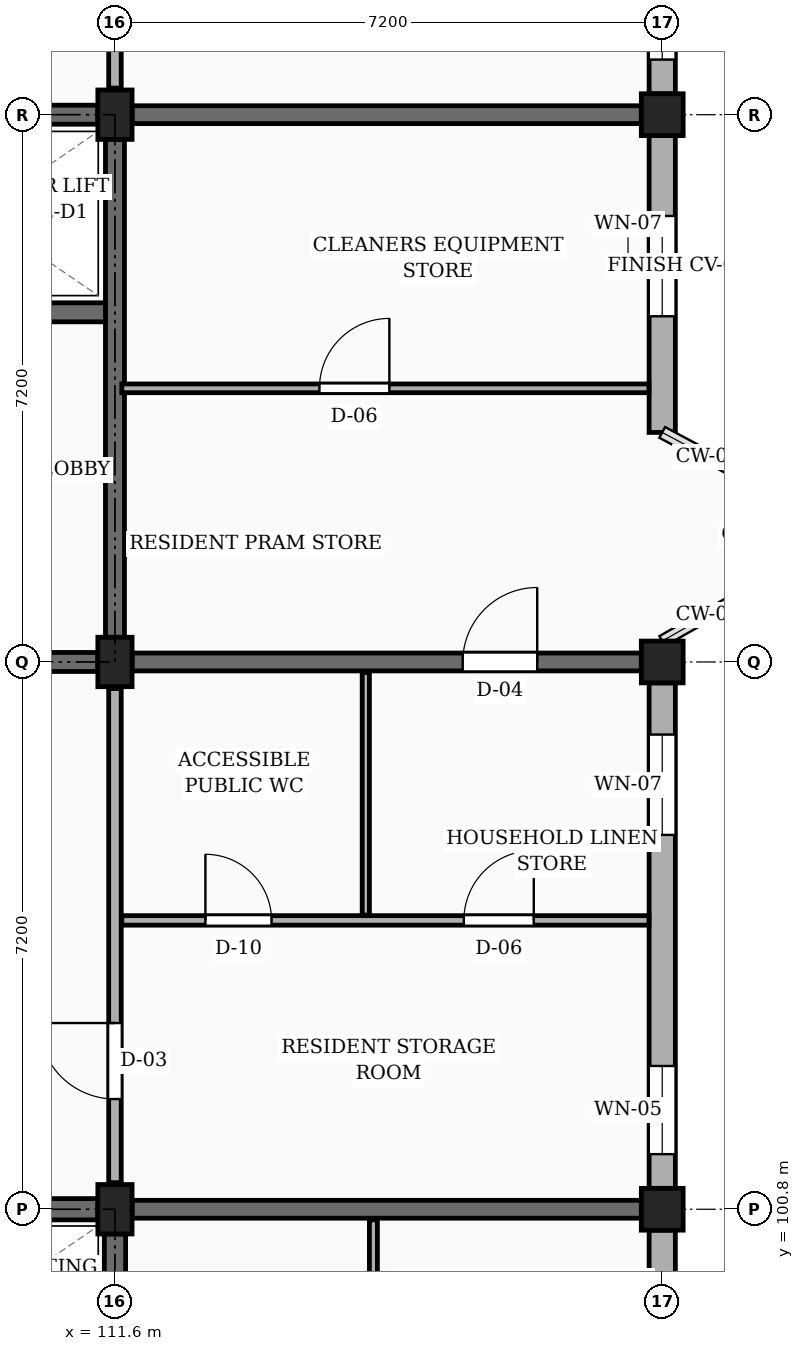
"""IFC4 building model, lengths in metres.
Left out: names, types, materials, properties, quantities, classifications, styles, units other than length and angle.
Written with IfcOpenShell. Run it as: python <this file> out.ifc"""

import sys

from ifc_helpers import new_model, si_unit, direction, frame, frame_2d, origin, origin_2d, place, context, subcontext, project, spatial, rectangle, extrude, element, fill, save


model = new_model("IFC4")
c1 = context("Model", 3, precision=1e-05, world=origin(), true_north=direction((0.0, 1.0)))
c2 = subcontext(c1, "Body", "Model", "MODEL_VIEW")
j1 = project(units=[si_unit("LENGTHUNIT", "METRE"), si_unit("PLANEANGLEUNIT", "RADIAN")], contexts=[c1])
p1 = place(None, origin())
s1 = spatial("IfcSite", under=j1, at=p1, CompositionType="ELEMENT")
p2 = place(p1, origin())
s2 = spatial("IfcBuilding", under=s1, at=p2, CompositionType="ELEMENT")
p3 = place(p2, frame((0.0, 0.0, 17.1)))
s3 = spatial("IfcBuildingStorey", under=s2, at=p3, CompositionType="ELEMENT", Elevation=17.1)
for number, where, z_axis, x_axis in (
    (1, (111.6, 100.8, 0.0), (0.0, 0.0, 1.0), (1.0, 0.0, 0.0)),
    (2, (111.6, 108.0, 0.0), (0.0, 0.0, 1.0), (1.0, 0.0, 0.0)),
    (3, (111.6, 115.2, 0.0), (0.0, 0.0, 1.0), (1.0, 0.0, 0.0)),
):
    element("IfcColumn", number, at=place(p3, frame(where, z_axis=z_axis, x_axis=x_axis)), inside=s3, PredefinedType="COLUMN", context=c2, shape_type="SweptSolid", body=[
        extrude(rectangle(XDim=0.45, YDim=0.65, at=origin_2d()), origin(), (0.0, 0.0, 1.0), 3.15),
    ])
for number, where, z_axis, x_axis in (
    (4, (118.8, 100.8, 0.0), (0.0, 0.0, 1.0), (1.0, 0.0, 0.0)),
    (5, (118.8, 108.0, 0.0), (0.0, 0.0, 1.0), (1.0, 0.0, 0.0)),
    (6, (118.8, 115.2, 0.0), (0.0, 0.0, 1.0), (1.0, 0.0, 0.0)),
):
    element("IfcColumn", number, at=place(p3, frame(where, z_axis=z_axis, x_axis=x_axis)), inside=s3, PredefinedType="COLUMN", context=c2, shape_type="SweptSolid", body=[
        extrude(rectangle(XDim=0.55, YDim=0.55, at=origin_2d()), origin(), (0.0, 0.0, 1.0), 3.15),
    ])
p4 = place(p3, frame((111.825, 100.8, 0.0), z_axis=(0.0, 0.0, 1.0), x_axis=(1.0, 0.0, 0.0)))
e7 = element("IfcWall", 7, at=p4, inside=s3, PredefinedType="SOLIDWALL", context=c2, shape_type="SweptSolid", body=[
    extrude(rectangle(XDim=6.7, YDim=0.235, at=frame_2d((3.35, 0.0))), origin(), (0.0, 0.0, 1.0), 2.19),
])
p5 = place(p3, frame((111.825, 108.0, 0.0), z_axis=(0.0, 0.0, 1.0), x_axis=(1.0, 0.0, 0.0)))
e8 = element("IfcWall", 8, at=p5, inside=s3, PredefinedType="SOLIDWALL", context=c2, shape_type="SweptSolid", body=[
    extrude(rectangle(XDim=6.7, YDim=0.235, at=frame_2d((3.35, 0.0))), origin(), (0.0, 0.0, 1.0), 2.19),
])
p6 = place(p5, frame((4.35, 0.0, 0.0)))
e9 = element("IfcOpeningElement", 9, at=p6, cuts=e8, PredefinedType="OPENING", context=c2, shape_type="SweptSolid", body=[
    extrude(rectangle(XDim=0.98, YDim=2.12, at=frame_2d((0.49, 1.06))), frame((0.0, 0.127, 0.0), z_axis=(0.0, -1.0, 0.0), x_axis=(1.0, 0.0, 0.0)), (0.0, 0.0, 1.0), 0.255),
])
p7 = place(p3, frame((111.825, 115.2, 0.0), z_axis=(0.0, 0.0, 1.0), x_axis=(1.0, 0.0, 0.0)))
e10 = element("IfcWall", 10, at=p7, inside=s3, PredefinedType="SOLIDWALL", context=c2, shape_type="SweptSolid", body=[
    extrude(rectangle(XDim=6.7, YDim=0.235, at=frame_2d((3.35, 0.0))), origin(), (0.0, 0.0, 1.0), 2.19),
])
p8 = place(p3, frame((118.8, 93.875, 0.0), z_axis=(0.0, 0.0, 1.0), x_axis=(0.0, 1.0, 0.0)))
e11 = element("IfcWall", 11, at=p8, inside=s3, PredefinedType="SOLIDWALL", context=c2, shape_type="SweptSolid", body=[
    extrude(rectangle(XDim=6.65, YDim=0.345, at=frame_2d((3.325, 0.0))), origin(), (0.0, 0.0, 1.0), 2.46),
])
p9 = place(p8, frame((0.45, 0.0, 0.78)))
e12 = element("IfcOpeningElement", 12, at=p9, cuts=e11, PredefinedType="OPENING", context=c2, shape_type="SweptSolid", body=[
    extrude(rectangle(XDim=1.0, YDim=1.15, at=frame_2d((0.5, 0.575))), frame((0.0, 0.183, 0.0), z_axis=(0.0, -1.0, 0.0), x_axis=(1.0, 0.0, 0.0)), (0.0, 0.0, 1.0), 0.365),
])
p10 = place(p8, frame((4.65, 0.0, 0.78)))
e13 = element("IfcOpeningElement", 13, at=p10, cuts=e11, PredefinedType="OPENING", context=c2, shape_type="SweptSolid", body=[
    extrude(rectangle(XDim=1.16, YDim=1.15, at=frame_2d((0.58, 0.575))), frame((0.0, 0.183, 0.0), z_axis=(0.0, -1.0, 0.0), x_axis=(1.0, 0.0, 0.0)), (0.0, 0.0, 1.0), 0.365),
])
p11 = place(p3, frame((118.8, 101.075, 0.0), z_axis=(0.0, 0.0, 1.0), x_axis=(0.0, 1.0, 0.0)))
e14 = element("IfcWall", 14, at=p11, inside=s3, PredefinedType="SOLIDWALL", context=c2, shape_type="SweptSolid", body=[
    extrude(rectangle(XDim=6.65, YDim=0.345, at=frame_2d((3.325, 0.0))), origin(), (0.0, 0.0, 1.0), 2.46),
])
p12 = place(p11, frame((0.45, 0.0, 0.78)))
e15 = element("IfcOpeningElement", 15, at=p12, cuts=e14, PredefinedType="OPENING", context=c2, shape_type="SweptSolid", body=[
    extrude(rectangle(XDim=1.16, YDim=1.15, at=frame_2d((0.58, 0.575))), frame((0.0, 0.183, 0.0), z_axis=(0.0, -1.0, 0.0), x_axis=(1.0, 0.0, 0.0)), (0.0, 0.0, 1.0), 0.365),
])
p13 = place(p11, frame((4.65, 0.0, 0.78)))
e16 = element("IfcOpeningElement", 16, at=p13, cuts=e14, PredefinedType="OPENING", context=c2, shape_type="SweptSolid", body=[
    extrude(rectangle(XDim=1.32, YDim=1.15, at=frame_2d((0.66, 0.575))), frame((0.0, 0.183, 0.0), z_axis=(0.0, -1.0, 0.0), x_axis=(1.0, 0.0, 0.0)), (0.0, 0.0, 1.0), 0.365),
])
p14 = place(p3, frame((118.8, 111.02, 0.0), z_axis=(0.0, 0.0, 1.0), x_axis=(0.0, 1.0, 0.0)))
e17 = element("IfcWall", 17, at=p14, inside=s3, PredefinedType="SOLIDWALL", context=c2, shape_type="SweptSolid", body=[
    extrude(rectangle(XDim=3.905, YDim=0.345, at=frame_2d((1.953, 0.0))), origin(), (0.0, 0.0, 1.0), 2.46),
])
p15 = place(p14, frame((1.528, 0.0, 0.78)))
e18 = element("IfcOpeningElement", 18, at=p15, cuts=e17, PredefinedType="OPENING", context=c2, shape_type="SweptSolid", body=[
    extrude(rectangle(XDim=1.32, YDim=1.15, at=frame_2d((0.66, 0.575))), frame((0.0, 0.183, 0.0), z_axis=(0.0, -1.0, 0.0), x_axis=(1.0, 0.0, 0.0)), (0.0, 0.0, 1.0), 0.365),
])
p16 = place(p3, frame((118.8, 115.475, 0.0), z_axis=(0.0, 0.0, 1.0), x_axis=(0.0, 1.0, 0.0)))
e19 = element("IfcWall", 19, at=p16, inside=s3, PredefinedType="SOLIDWALL", context=c2, shape_type="SweptSolid", body=[
    extrude(rectangle(XDim=6.65, YDim=0.345, at=frame_2d((3.325, 0.0))), origin(), (0.0, 0.0, 1.0), 2.46),
])
p17 = place(p16, frame((0.45, 0.0, 0.78)))
e20 = element("IfcOpeningElement", 20, at=p17, cuts=e19, PredefinedType="OPENING", context=c2, shape_type="SweptSolid", body=[
    extrude(rectangle(XDim=1.4, YDim=1.15, at=frame_2d((0.7, 0.575))), frame((0.0, 0.183, 0.0), z_axis=(0.0, -1.0, 0.0), x_axis=(1.0, 0.0, 0.0)), (0.0, 0.0, 1.0), 0.365),
])
p18 = place(p16, frame((4.65, 0.0, 0.78)))
e21 = element("IfcOpeningElement", 21, at=p18, cuts=e19, PredefinedType="OPENING", context=c2, shape_type="SweptSolid", body=[
    extrude(rectangle(XDim=0.96, YDim=1.26, at=frame_2d((0.48, 0.63))), frame((0.0, 0.183, 0.0), z_axis=(0.0, -1.0, 0.0), x_axis=(1.0, 0.0, 0.0)), (0.0, 0.0, 1.0), 0.365),
])
p19 = place(p3, frame((104.625, 100.8, 0.0), z_axis=(0.0, 0.0, 1.0), x_axis=(1.0, 0.0, 0.0)))
e22 = element("IfcWall", 22, at=p19, inside=s3, PredefinedType="SHEAR", context=c2, shape_type="SweptSolid", body=[
    extrude(rectangle(XDim=6.75, YDim=0.28, at=frame_2d((3.375, 0.0))), origin(), (0.0, 0.0, 1.0), 2.89),
])
p20 = place(p3, frame((111.6, 93.925, 0.0), z_axis=(0.0, 0.0, 1.0), x_axis=(0.0, 1.0, 0.0)))
e23 = element("IfcWall", 23, at=p20, inside=s3, PredefinedType="SHEAR", context=c2, shape_type="SweptSolid", body=[
    extrude(rectangle(XDim=6.55, YDim=0.28, at=frame_2d((3.275, 0.0))), origin(), (0.0, 0.0, 1.0), 2.89),
])
p21 = place(p3, frame((104.625, 115.2, 0.0), z_axis=(0.0, 0.0, 1.0), x_axis=(1.0, 0.0, 0.0)))
e24 = element("IfcWall", 24, at=p21, inside=s3, PredefinedType="SHEAR", context=c2, shape_type="SweptSolid", body=[
    extrude(rectangle(XDim=6.75, YDim=0.25, at=frame_2d((3.375, 0.0))), origin(), (0.0, 0.0, 1.0), 2.89),
])
p22 = place(p3, frame((111.6, 108.325, 0.0), z_axis=(0.0, 0.0, 1.0), x_axis=(0.0, 1.0, 0.0)))
e25 = element("IfcWall", 25, at=p22, inside=s3, PredefinedType="SHEAR", context=c2, shape_type="SweptSolid", body=[
    extrude(rectangle(XDim=6.55, YDim=0.25, at=frame_2d((3.275, 0.0))), origin(), (0.0, 0.0, 1.0), 2.89),
])
p23 = place(p3, frame((104.625, 108.0, 0.0), z_axis=(0.0, 0.0, 1.0), x_axis=(1.0, 0.0, 0.0)))
e26 = element("IfcWall", 26, at=p23, inside=s3, PredefinedType="SHEAR", context=c2, shape_type="SweptSolid", body=[
    extrude(rectangle(XDim=6.75, YDim=0.25, at=frame_2d((3.375, 0.0))), origin(), (0.0, 0.0, 1.0), 2.89),
])
p24 = place(p23, frame((4.525, 0.0, 0.0)))
e27 = element("IfcOpeningElement", 27, at=p24, cuts=e26, PredefinedType="OPENING", context=c2, shape_type="SweptSolid", body=[
    extrude(rectangle(XDim=1.1, YDim=2.15, at=frame_2d((0.55, 1.075))), frame((0.0, 0.135, 0.0), z_axis=(0.0, -1.0, 0.0), x_axis=(1.0, 0.0, 0.0)), (0.0, 0.0, 1.0), 0.27),
])
p25 = place(p3, frame((108.125, 112.6, 0.0), z_axis=(0.0, 0.0, 1.0), x_axis=(1.0, 0.0, 0.0)))
e28 = element("IfcWall", 28, at=p25, inside=s3, PredefinedType="SHEAR", context=c2, shape_type="SweptSolid", body=[
    extrude(rectangle(XDim=3.35, YDim=0.25, at=frame_2d((1.675, 0.0))), origin(), (0.0, 0.0, 1.0), 2.89),
])
p26 = place(p25, frame((1.1, 0.0, 0.0)))
e29 = element("IfcOpeningElement", 29, at=p26, cuts=e28, PredefinedType="OPENING", context=c2, shape_type="SweptSolid", body=[
    extrude(rectangle(XDim=1.0, YDim=2.2, at=frame_2d((0.5, 1.1))), frame((0.0, 0.135, 0.0), z_axis=(0.0, -1.0, 0.0), x_axis=(1.0, 0.0, 0.0)), (0.0, 0.0, 1.0), 0.27),
])
p27 = place(p3, frame((111.6, 101.15, 0.0), z_axis=(0.0, 0.0, 1.0), x_axis=(0.0, 1.0, 0.0)))
e30 = element("IfcWall", 30, at=p27, inside=s3, PredefinedType="PARTITIONING", context=c2, shape_type="SweptSolid", body=[
    extrude(rectangle(XDim=6.5, YDim=0.165, at=frame_2d((3.25, 0.0))), origin(), (0.0, 0.0, 1.0), 2.325),
])
p28 = place(p27, frame((1.1, 0.0, 0.0)))
e31 = element("IfcOpeningElement", 31, at=p28, cuts=e30, PredefinedType="OPENING", context=c2, shape_type="SweptSolid", body=[
    extrude(rectangle(XDim=1.0, YDim=2.15, at=frame_2d((0.5, 1.075))), frame((0.0, 0.093, 0.0), z_axis=(0.0, -1.0, 0.0), x_axis=(1.0, 0.0, 0.0)), (0.0, 0.0, 1.0), 0.185),
])
p29 = place(p3, frame((111.6, 115.55, 0.0), z_axis=(0.0, 0.0, 1.0), x_axis=(0.0, 1.0, 0.0)))
e32 = element("IfcWall", 32, at=p29, inside=s3, PredefinedType="PARTITIONING", context=c2, shape_type="SweptSolid", body=[
    extrude(rectangle(XDim=6.5, YDim=0.165, at=frame_2d((3.25, 0.0))), origin(), (0.0, 0.0, 1.0), 2.325),
])
p30 = place(p29, frame((1.1, 0.0, 0.0)))
e33 = element("IfcOpeningElement", 33, at=p30, cuts=e32, PredefinedType="OPENING", context=c2, shape_type="SweptSolid", body=[
    extrude(rectangle(XDim=0.94, YDim=2.12, at=frame_2d((0.47, 1.06))), frame((0.0, 0.093, 0.0), z_axis=(0.0, -1.0, 0.0), x_axis=(1.0, 0.0, 0.0)), (0.0, 0.0, 1.0), 0.185),
])
p31 = place(p3, frame((115.0, 96.97, 0.0), z_axis=(0.0, 0.0, 1.0), x_axis=(0.0, 1.0, 0.0)))
e34 = element("IfcWall", 34, at=p31, inside=s3, PredefinedType="PARTITIONING", context=c2, shape_type="SweptSolid", body=[
    extrude(rectangle(XDim=3.69, YDim=0.105, at=frame_2d((1.845, 0.0))), origin(), (0.0, 0.0, 1.0), 2.325),
])
p32 = place(p3, frame((111.69, 104.6, 0.0), z_axis=(0.0, 0.0, 1.0), x_axis=(1.0, 0.0, 0.0)))
e35 = element("IfcWall", 35, at=p32, inside=s3, PredefinedType="PARTITIONING", context=c2, shape_type="SweptSolid", body=[
    extrude(rectangle(XDim=6.935, YDim=0.125, at=frame_2d((3.468, 0.0))), origin(), (0.0, 0.0, 1.0), 2.325),
])
p33 = place(p32, frame((1.1, 0.0, 0.0)))
e36 = element("IfcOpeningElement", 36, at=p33, cuts=e35, PredefinedType="OPENING", context=c2, shape_type="SweptSolid", body=[
    extrude(rectangle(XDim=0.87, YDim=2.05, at=frame_2d((0.435, 1.025))), frame((0.0, 0.073, 0.0), z_axis=(0.0, -1.0, 0.0), x_axis=(1.0, 0.0, 0.0)), (0.0, 0.0, 1.0), 0.145),
])
p34 = place(p32, frame((4.5, 0.0, 0.0)))
e37 = element("IfcOpeningElement", 37, at=p34, cuts=e35, PredefinedType="OPENING", context=c2, shape_type="SweptSolid", body=[
    extrude(rectangle(XDim=0.92, YDim=2.1, at=frame_2d((0.46, 1.05))), frame((0.0, 0.073, 0.0), z_axis=(0.0, -1.0, 0.0), x_axis=(1.0, 0.0, 0.0)), (0.0, 0.0, 1.0), 0.145),
])
p35 = place(p3, frame((114.9, 104.67, 0.0), z_axis=(0.0, 0.0, 1.0), x_axis=(0.0, 1.0, 0.0)))
e38 = element("IfcWall", 38, at=p35, inside=s3, PredefinedType="PARTITIONING", context=c2, shape_type="SweptSolid", body=[
    extrude(rectangle(XDim=3.19, YDim=0.095, at=frame_2d((1.595, 0.0))), origin(), (0.0, 0.0, 1.0), 2.325),
])
p36 = place(p3, frame((111.69, 111.6, 0.0), z_axis=(0.0, 0.0, 1.0), x_axis=(1.0, 0.0, 0.0)))
e39 = element("IfcWall", 39, at=p36, inside=s3, PredefinedType="PARTITIONING", context=c2, shape_type="SweptSolid", body=[
    extrude(rectangle(XDim=6.935, YDim=0.115, at=frame_2d((3.468, 0.0))), origin(), (0.0, 0.0, 1.0), 2.325),
])
p37 = place(p36, frame((2.6, 0.0, 0.0)))
e40 = element("IfcOpeningElement", 40, at=p37, cuts=e39, PredefinedType="OPENING", context=c2, shape_type="SweptSolid", body=[
    extrude(rectangle(XDim=0.92, YDim=2.1, at=frame_2d((0.46, 1.05))), frame((0.0, 0.067, 0.0), z_axis=(0.0, -1.0, 0.0), x_axis=(1.0, 0.0, 0.0)), (0.0, 0.0, 1.0), 0.135),
])
p38 = place(p12, origin())
e41 = element("IfcWindow", 41, at=p38, inside=s3, PartitioningType="SINGLE_PANEL", PredefinedType="WINDOW", context=c2, shape_type="SweptSolid", body=[
    extrude(rectangle(XDim=1.16, YDim=1.15, at=frame_2d((0.58, 0.575))), frame((0.0, 0.03, 0.0), z_axis=(0.0, -1.0, 0.0), x_axis=(1.0, 0.0, 0.0)), (0.0, 0.0, 1.0), 0.06),
])
fill(e15, e41)
p39 = place(p13, origin())
e42 = element("IfcWindow", 42, at=p39, inside=s3, PartitioningType="SINGLE_PANEL", PredefinedType="WINDOW", context=c2, shape_type="SweptSolid", body=[
    extrude(rectangle(XDim=1.32, YDim=1.15, at=frame_2d((0.66, 0.575))), frame((0.0, 0.03, 0.0), z_axis=(0.0, -1.0, 0.0), x_axis=(1.0, 0.0, 0.0)), (0.0, 0.0, 1.0), 0.06),
])
fill(e16, e42)
p40 = place(p15, origin())
e43 = element("IfcWindow", 43, at=p40, inside=s3, PartitioningType="SINGLE_PANEL", PredefinedType="WINDOW", context=c2, shape_type="SweptSolid", body=[
    extrude(rectangle(XDim=1.32, YDim=1.15, at=frame_2d((0.66, 0.575))), frame((0.0, 0.03, 0.0), z_axis=(0.0, -1.0, 0.0), x_axis=(1.0, 0.0, 0.0)), (0.0, 0.0, 1.0), 0.06),
])
fill(e18, e43)
p41 = place(p17, origin())
e44 = element("IfcWindow", 44, at=p41, inside=s3, PartitioningType="SINGLE_PANEL", PredefinedType="WINDOW", context=c2, shape_type="SweptSolid", body=[
    extrude(rectangle(XDim=1.4, YDim=1.15, at=frame_2d((0.7, 0.575))), frame((0.0, 0.03, 0.0), z_axis=(0.0, -1.0, 0.0), x_axis=(1.0, 0.0, 0.0)), (0.0, 0.0, 1.0), 0.06),
])
fill(e20, e44)
p42 = place(p28, origin())
e45 = element("IfcDoor", 45, at=p42, inside=s3, OperationType="SINGLE_SWING_RIGHT", PredefinedType="DOOR", context=c2, shape_type="SweptSolid", body=[
    extrude(rectangle(XDim=1.0, YDim=2.15, at=frame_2d((0.5, 1.075))), frame((0.0, 0.025, 0.0), z_axis=(0.0, -1.0, 0.0), x_axis=(1.0, 0.0, 0.0)), (0.0, 0.0, 1.0), 0.05),
])
fill(e31, e45)
p43 = place(p33, origin())
e46 = element("IfcDoor", 46, at=p43, inside=s3, OperationType="SINGLE_SWING_LEFT", PredefinedType="DOOR", context=c2, shape_type="SweptSolid", body=[
    extrude(rectangle(XDim=0.87, YDim=2.05, at=frame_2d((0.435, 1.025))), frame((0.0, 0.025, 0.0), z_axis=(0.0, -1.0, 0.0), x_axis=(1.0, 0.0, 0.0)), (0.0, 0.0, 1.0), 0.05),
])
fill(e36, e46)
p44 = place(p34, origin())
e47 = element("IfcDoor", 47, at=p44, inside=s3, OperationType="SINGLE_SWING_RIGHT", PredefinedType="DOOR", context=c2, shape_type="SweptSolid", body=[
    extrude(rectangle(XDim=0.92, YDim=2.1, at=frame_2d((0.46, 1.05))), frame((0.0, 0.025, 0.0), z_axis=(0.0, -1.0, 0.0), x_axis=(1.0, 0.0, 0.0)), (0.0, 0.0, 1.0), 0.05),
])
fill(e37, e47)
p45 = place(p37, origin())
e48 = element("IfcDoor", 48, at=p45, inside=s3, OperationType="SINGLE_SWING_RIGHT", PredefinedType="DOOR", context=c2, shape_type="SweptSolid", body=[
    extrude(rectangle(XDim=0.92, YDim=2.1, at=frame_2d((0.46, 1.05))), frame((0.0, 0.025, 0.0), z_axis=(0.0, -1.0, 0.0), x_axis=(1.0, 0.0, 0.0)), (0.0, 0.0, 1.0), 0.05),
])
fill(e40, e48)
p46 = place(p6, origin())
e49 = element("IfcDoor", 49, at=p46, inside=s3, OperationType="SINGLE_SWING_RIGHT", PredefinedType="DOOR", context=c2, shape_type="SweptSolid", body=[
    extrude(rectangle(XDim=0.98, YDim=2.12, at=frame_2d((0.49, 1.06))), frame((0.0, 0.025, 0.0), z_axis=(0.0, -1.0, 0.0), x_axis=(1.0, 0.0, 0.0)), (0.0, 0.0, 1.0), 0.05),
])
fill(e9, e49)
save(model, sys.argv[1])
